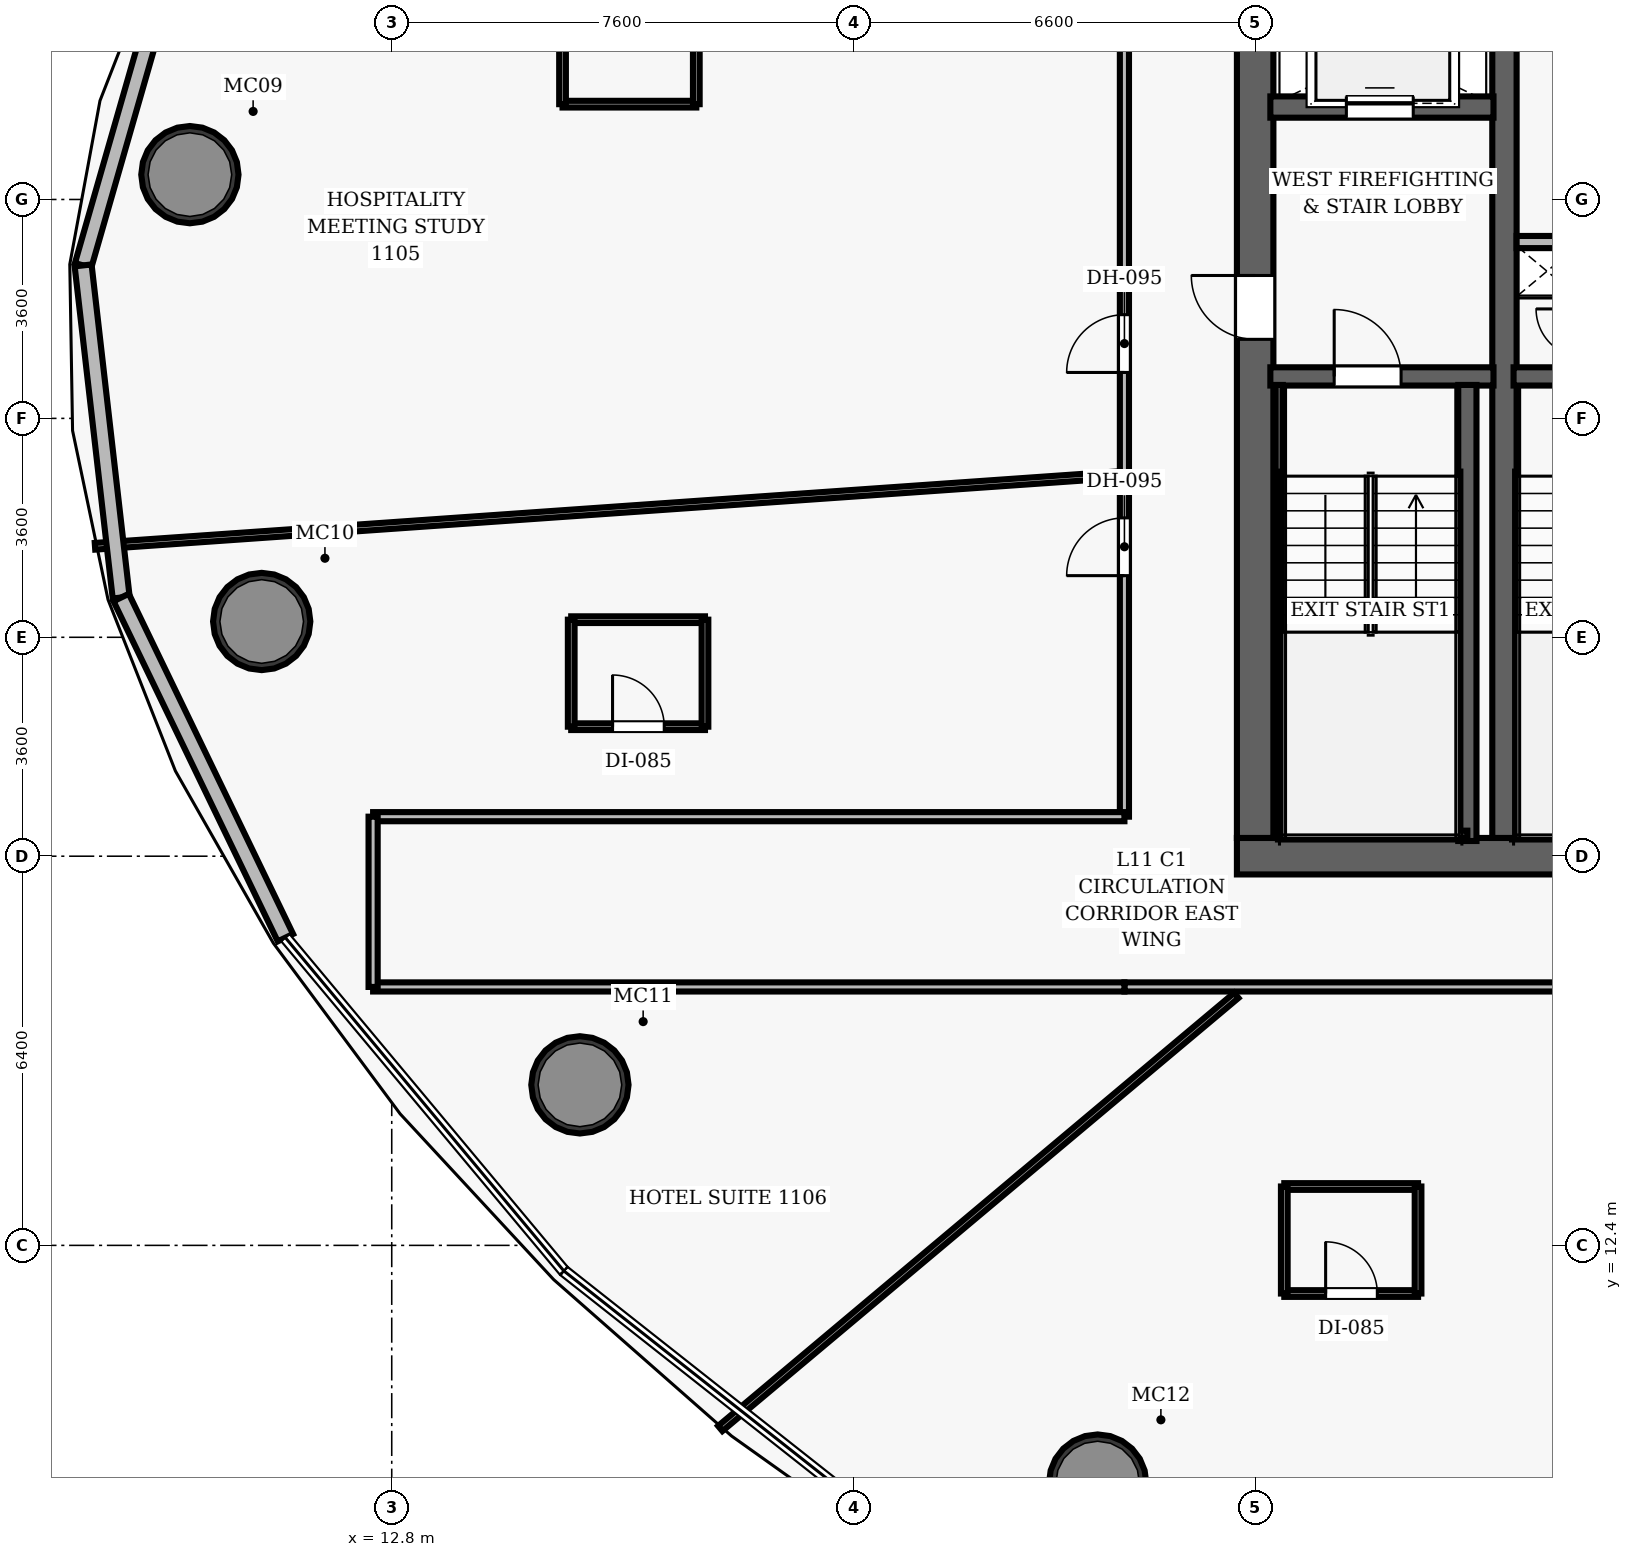
"""IFC4 building model, lengths in metres.
Left out: names, types, materials, properties, quantities, classifications, styles, units other than length and angle.
Written with IfcOpenShell. Run it as: python <this file> out.ifc"""

import sys

from ifc_helpers import new_model, si_unit, direction, frame, frame_2d, origin, origin_2d, place, context, subcontext, project, spatial, rectangle, hollow_circle, extrude, element, fill, save


model = new_model("IFC4")
c1 = context("Model", 3, precision=1e-05, world=origin(), true_north=direction((0.0, 1.0)))
c2 = subcontext(c1, "Body", "Model", "MODEL_VIEW")
j1 = project(units=[si_unit("LENGTHUNIT", "METRE"), si_unit("PLANEANGLEUNIT", "RADIAN")], contexts=[c1])
p1 = place(None, origin())
s1 = spatial("IfcSite", under=j1, at=p1, CompositionType="ELEMENT")
p2 = place(p1, origin())
s2 = spatial("IfcBuilding", under=s1, at=p2, CompositionType="ELEMENT")
p3 = place(p2, frame((0.0, 0.0, 55.4)))
s3 = spatial("IfcBuildingStorey", under=s2, at=p3, CompositionType="ELEMENT", Elevation=55.4)
p4 = place(p3, frame((26.7, 18.8, 0.0), z_axis=(0.0, 0.0, 1.0), x_axis=(1.0, 0.0, 0.0)))
e1 = element("IfcWall", 1, at=p4, inside=s3, PredefinedType="SHEAR", context=c2, shape_type="SweptSolid", body=[
    extrude(rectangle(XDim=22.6, YDim=0.6, at=frame_2d((11.3, 0.0))), origin(), (0.0, 0.0, 1.0), 3.5),
])
p5 = place(p4, frame((14.52, 0.0, 0.0)))
e2 = element("IfcOpeningElement", 2, at=p5, cuts=e1, PredefinedType="OPENING", context=c2, shape_type="SweptSolid", body=[
    extrude(rectangle(XDim=1.05, YDim=2.15, at=frame_2d((0.525, 1.075))), frame((0.0, 0.31, 0.0), z_axis=(0.0, -1.0, 0.0), x_axis=(1.0, 0.0, 0.0)), (0.0, 0.0, 1.0), 0.62),
])
p6 = place(p3, frame((27.0, 19.1, 0.0), z_axis=(0.0, 0.0, 1.0), x_axis=(0.0, 1.0, 0.0)))
e3 = element("IfcWall", 3, at=p6, inside=s3, PredefinedType="SHEAR", context=c2, shape_type="SweptSolid", body=[
    extrude(rectangle(XDim=13.8, YDim=0.6, at=frame_2d((6.9, 0.0))), origin(), (0.0, 0.0, 1.0), 3.5),
])
p7 = place(p6, frame((8.2, 0.0, 0.0)))
e4 = element("IfcOpeningElement", 4, at=p7, cuts=e3, PredefinedType="OPENING", context=c2, shape_type="SweptSolid", body=[
    extrude(rectangle(XDim=1.05, YDim=2.15, at=frame_2d((0.525, 1.075))), frame((0.0, 0.31, 0.0), z_axis=(0.0, -1.0, 0.0), x_axis=(1.0, 0.0, 0.0)), (0.0, 0.0, 1.0), 0.62),
])
p8 = place(p3, frame((31.1, 19.1, 0.0), z_axis=(0.0, 0.0, 1.0), x_axis=(0.0, 1.0, 0.0)))
e5 = element("IfcWall", 5, at=p8, inside=s3, PredefinedType="SHEAR", context=c2, shape_type="SweptSolid", body=[
    extrude(rectangle(XDim=13.8, YDim=0.4, at=frame_2d((6.9, 0.0))), origin(), (0.0, 0.0, 1.0), 3.5),
])
for number, where, z_axis, x_axis in (
    (6, (9.48, 30.008, 0.0), (0.0, 0.0, 1.0), (1.0, 0.0, 0.0)),
    (7, (10.661, 22.66, 0.0), (0.0, 0.0, 1.0), (1.0, 0.0, 0.0)),
    (8, (15.895, 15.04, 0.0), (0.0, 0.0, 1.0), (1.0, 0.0, 0.0)),
    (9, (24.41, 8.491, 0.0), (0.0, 0.0, 1.0), (1.0, 0.0, 0.0)),
):
    element("IfcColumn", number, at=place(p3, frame(where, z_axis=z_axis, x_axis=x_axis)), inside=s3, PredefinedType="COLUMN", context=c2, shape_type="SweptSolid", body=[
        extrude(hollow_circle(Radius=0.8, WallThickness=0.06, at=origin_2d()), origin(), (0.0, 0.0, 1.0), 3.5),
    ])
p9 = place(p3, frame((27.25, 26.69, 0.0), z_axis=(0.0, 0.0, 1.0), x_axis=(1.0, 0.0, 0.0)))
e10 = element("IfcWall", 10, at=p9, inside=s3, PredefinedType="SHEAR", context=c2, shape_type="SweptSolid", body=[
    extrude(rectangle(XDim=3.67, YDim=0.3, at=frame_2d((1.835, 0.0))), origin(), (0.0, 0.0, 1.0), 3.5),
])
p10 = place(p9, frame((1.05, 0.0, 0.0)))
e11 = element("IfcOpeningElement", 11, at=p10, cuts=e10, PredefinedType="OPENING", context=c2, shape_type="SweptSolid", body=[
    extrude(rectangle(XDim=1.1, YDim=2.15, at=frame_2d((0.55, 1.075))), frame((0.0, 0.16, 0.0), z_axis=(0.0, -1.0, 0.0), x_axis=(1.0, 0.0, 0.0)), (0.0, 0.0, 1.0), 0.32),
])
p11 = place(p3, frame((30.49, 19.05, 0.0), z_axis=(0.0, 0.0, 1.0), x_axis=(0.0, 1.0, 0.0)))
e12 = element("IfcWall", 12, at=p11, inside=s3, PredefinedType="SHEAR", context=c2, shape_type="SweptSolid", body=[
    extrude(rectangle(XDim=7.5, YDim=0.3, at=frame_2d((3.75, 0.0))), origin(), (0.0, 0.0, 1.0), 3.5),
])
p12 = place(p3, frame((27.395, 19.1, 0.0), z_axis=(0.0, 0.0, 1.0), x_axis=(0.0, 1.0, 0.0)))
e13 = element("IfcWall", 13, at=p12, inside=s3, PredefinedType="SHEAR", context=c2, shape_type="SweptSolid", body=[
    extrude(rectangle(XDim=7.45, YDim=0.12, at=frame_2d((3.725, 0.0))), origin(), (0.0, 0.0, 1.0), 3.5),
])
p13 = place(p3, frame((27.395, 19.16, 0.0), z_axis=(0.0, 0.0, 1.0), x_axis=(1.0, 0.0, 0.0)))
e14 = element("IfcWall", 14, at=p13, inside=s3, PredefinedType="SHEAR", context=c2, shape_type="SweptSolid", body=[
    extrude(rectangle(XDim=3.095, YDim=0.12, at=frame_2d((1.547, 0.0))), origin(), (0.0, 0.0, 1.0), 3.5),
])
p14 = place(p3, frame((27.25, 31.12, 0.0), z_axis=(0.0, 0.0, 1.0), x_axis=(1.0, 0.0, 0.0)))
e15 = element("IfcWall", 15, at=p14, inside=s3, PredefinedType="SHEAR", context=c2, shape_type="SweptSolid", body=[
    extrude(rectangle(XDim=3.67, YDim=0.35, at=frame_2d((1.835, 0.0))), origin(), (0.0, 0.0, 1.0), 2.6),
])
p15 = place(p14, frame((1.25, 0.0, 0.0)))
e16 = element("IfcOpeningElement", 16, at=p15, cuts=e15, PredefinedType="OPENING", context=c2, shape_type="SweptSolid", body=[
    extrude(rectangle(XDim=1.1, YDim=2.15, at=frame_2d((0.55, 1.075))), frame((0.0, 0.185, 0.0), z_axis=(0.0, -1.0, 0.0), x_axis=(1.0, 0.0, 0.0)), (0.0, 0.0, 1.0), 0.37),
])
p16 = place(p3, frame((31.25, 26.69, 0.0), z_axis=(0.0, 0.0, 1.0), x_axis=(1.0, 0.0, 0.0)))
e17 = element("IfcWall", 17, at=p16, inside=s3, PredefinedType="SHEAR", context=c2, shape_type="SweptSolid", body=[
    extrude(rectangle(XDim=3.56, YDim=0.3, at=frame_2d((1.78, 0.0))), origin(), (0.0, 0.0, 1.0), 3.5),
])
p17 = place(p16, frame((1.55, 0.0, 0.0)))
e18 = element("IfcOpeningElement", 18, at=p17, cuts=e17, PredefinedType="OPENING", context=c2, shape_type="SweptSolid", body=[
    extrude(rectangle(XDim=1.1, YDim=2.15, at=frame_2d((0.55, 1.075))), frame((0.0, 0.16, 0.0), z_axis=(0.0, -1.0, 0.0), x_axis=(1.0, 0.0, 0.0)), (0.0, 0.0, 1.0), 0.32),
])
p18 = place(p3, frame((31.3, 19.16, 0.0), z_axis=(0.0, 0.0, 1.0), x_axis=(1.0, 0.0, 0.0)))
e19 = element("IfcWall", 19, at=p18, inside=s3, PredefinedType="SHEAR", context=c2, shape_type="SweptSolid", body=[
    extrude(rectangle(XDim=3.04, YDim=0.12, at=frame_2d((1.52, 0.0))), origin(), (0.0, 0.0, 1.0), 3.5),
])
p19 = place(p3, frame((31.3, 28.9, 0.0), z_axis=(0.0, 0.0, 1.0), x_axis=(1.0, 0.0, 0.0)))
e20 = element("IfcWall", 20, at=p19, inside=s3, PredefinedType="PARTITIONING", context=c2, shape_type="SweptSolid", body=[
    extrude(rectangle(XDim=1.12, YDim=0.2, at=frame_2d((0.56, 0.0))), origin(), (0.0, 0.0, 1.0), 2.6),
])
p20 = place(p3, frame((24.85, 16.65, 0.0), z_axis=(0.0, 0.0, 1.0), x_axis=(1.0, 0.0, 0.0)))
e21 = element("IfcWall", 21, at=p20, inside=s3, PredefinedType="PARTITIONING", context=c2, shape_type="SweptSolid", body=[
    extrude(rectangle(XDim=23.5, YDim=0.15, at=frame_2d((11.75, 0.0))), origin(), (0.0, 0.0, 1.0), 2.6),
])
p21 = place(p20, frame((8.216, 0.0, 0.0)))
e22 = element("IfcOpeningElement", 22, at=p21, cuts=e21, PredefinedType="OPENING", context=c2, shape_type="SweptSolid", body=[
    extrude(rectangle(XDim=0.95, YDim=2.15, at=frame_2d((0.475, 1.075))), frame((0.0, 0.085, 0.0), z_axis=(0.0, -1.0, 0.0), x_axis=(1.0, 0.0, 0.0)), (0.0, 0.0, 1.0), 0.17),
])
p22 = place(p20, frame((15.103, 0.0, 0.0)))
e23 = element("IfcOpeningElement", 23, at=p22, cuts=e21, PredefinedType="OPENING", context=c2, shape_type="SweptSolid", body=[
    extrude(rectangle(XDim=0.95, YDim=2.15, at=frame_2d((0.475, 1.075))), frame((0.0, 0.085, 0.0), z_axis=(0.0, -1.0, 0.0), x_axis=(1.0, 0.0, 0.0)), (0.0, 0.0, 1.0), 0.17),
])
p23 = place(p20, frame((17.91, 0.0, 0.0)))
e24 = element("IfcOpeningElement", 24, at=p23, cuts=e21, PredefinedType="OPENING", context=c2, shape_type="SweptSolid", body=[
    extrude(rectangle(XDim=0.95, YDim=2.15, at=frame_2d((0.475, 1.075))), frame((0.0, 0.085, 0.0), z_axis=(0.0, -1.0, 0.0), x_axis=(1.0, 0.0, 0.0)), (0.0, 0.0, 1.0), 0.17),
])
p24 = place(p3, frame((24.85, 19.45, 0.0), z_axis=(0.0, 0.0, 1.0), x_axis=(0.0, 1.0, 0.0)))
e25 = element("IfcWall", 25, at=p24, inside=s3, PredefinedType="PARTITIONING", context=c2, shape_type="SweptSolid", body=[
    extrude(rectangle(XDim=15.9, YDim=0.15, at=frame_2d((7.95, 0.0))), origin(), (0.0, 0.0, 1.0), 2.6),
])
p25 = place(p24, frame((7.305, 0.0, 0.0)))
e26 = element("IfcOpeningElement", 26, at=p25, cuts=e25, PredefinedType="OPENING", context=c2, shape_type="SweptSolid", body=[
    extrude(rectangle(XDim=0.95, YDim=2.15, at=frame_2d((0.475, 1.075))), frame((0.0, 0.085, 0.0), z_axis=(0.0, -1.0, 0.0), x_axis=(1.0, 0.0, 0.0)), (0.0, 0.0, 1.0), 0.17),
])
p26 = place(p24, frame((3.964, 0.0, 0.0)))
e27 = element("IfcOpeningElement", 27, at=p26, cuts=e25, PredefinedType="OPENING", context=c2, shape_type="SweptSolid", body=[
    extrude(rectangle(XDim=0.95, YDim=2.15, at=frame_2d((0.475, 1.075))), frame((0.0, 0.085, 0.0), z_axis=(0.0, -1.0, 0.0), x_axis=(1.0, 0.0, 0.0)), (0.0, 0.0, 1.0), 0.17),
])
for number, where, z_axis, x_axis in (
    (28, (12.494, 19.45, 0.0), (0.0, 0.0, 1.0), (1.0, 0.0, 0.0)),
    (29, (12.494, 16.65, 0.0), (0.0, 0.0, 1.0), (1.0, 0.0, 0.0)),
):
    element("IfcWall", number, at=place(p3, frame(where, z_axis=z_axis, x_axis=x_axis)), inside=s3, PredefinedType="PARTITIONING", context=c2, shape_type="SweptSolid", body=[
        extrude(rectangle(XDim=12.356, YDim=0.15, at=frame_2d((6.178, 0.0))), origin(), (0.0, 0.0, 1.0), 2.6),
    ])
p27 = place(p3, frame((12.494, 16.65, 0.0), z_axis=(0.0, 0.0, 1.0), x_axis=(0.0, 1.0, 0.0)))
e30 = element("IfcWall", 30, at=p27, inside=s3, PredefinedType="PARTITIONING", context=c2, shape_type="SweptSolid", body=[
    extrude(rectangle(XDim=2.8, YDim=0.15, at=frame_2d((1.4, 0.0))), origin(), (0.0, 0.0, 1.0), 2.6),
])
p28 = place(p3, frame((24.71, 25.071, 0.0), z_axis=(0.0, 0.0, 1.0), x_axis=(-0.997563188769, -0.069768792538, 0.0)))
e31 = element("IfcWall", 31, at=p28, inside=s3, PredefinedType="PARTITIONING", context=c2, shape_type="SweptSolid", body=[
    extrude(rectangle(XDim=16.832, YDim=0.11, at=frame_2d((8.416, 0.0))), origin(), (0.0, 0.0, 1.0), 2.6),
])
p29 = place(p3, frame((26.69, 16.51, 0.0), z_axis=(0.0, 0.0, 1.0), x_axis=(-0.766038579341, -0.642794597801, 0.0)))
e32 = element("IfcWall", 32, at=p29, inside=s3, PredefinedType="PARTITIONING", context=c2, shape_type="SweptSolid", body=[
    extrude(rectangle(XDim=11.08, YDim=0.11, at=frame_2d((5.54, 0.0))), origin(), (0.0, 0.0, 1.0), 2.6),
])
p30 = place(p3, frame((15.609, 31.167, 0.0), z_axis=(0.0, 0.0, 1.0), x_axis=(1.0, 0.0, 0.0)))
e33 = element("IfcWall", 33, at=p30, inside=s3, PredefinedType="PARTITIONING", context=c2, shape_type="SweptSolid", body=[
    extrude(rectangle(XDim=2.2, YDim=0.11, at=frame_2d((1.1, 0.0))), origin(), (0.0, 0.0, 1.0), 2.6),
])
for number, where, z_axis, x_axis in (
    (34, (15.609, 31.167, 0.0), (0.0, 0.0, 1.0), (0.0, 1.0, 0.0)),
    (35, (17.809, 31.167, 0.0), (0.0, 0.0, 1.0), (0.0, 1.0, 0.0)),
):
    element("IfcWall", number, at=place(p3, frame(where, z_axis=z_axis, x_axis=x_axis)), inside=s3, PredefinedType="PARTITIONING", context=c2, shape_type="SweptSolid", body=[
        extrude(rectangle(XDim=1.76, YDim=0.11, at=frame_2d((0.88, 0.0))), origin(), (0.0, 0.0, 1.0), 2.6),
    ])
p31 = place(p3, frame((15.752, 20.93, 0.0), z_axis=(0.0, 0.0, 1.0), x_axis=(1.0, 0.0, 0.0)))
e36 = element("IfcWall", 36, at=p31, inside=s3, PredefinedType="PARTITIONING", context=c2, shape_type="SweptSolid", body=[
    extrude(rectangle(XDim=2.2, YDim=0.11, at=frame_2d((1.1, 0.0))), origin(), (0.0, 0.0, 1.0), 2.6),
])
p32 = place(p31, frame((0.68, 0.0, 0.0)))
e37 = element("IfcOpeningElement", 37, at=p32, cuts=e36, PredefinedType="OPENING", context=c2, shape_type="SweptSolid", body=[
    extrude(rectangle(XDim=0.85, YDim=2.1, at=frame_2d((0.425, 1.05))), frame((0.0, 0.065, 0.0), z_axis=(0.0, -1.0, 0.0), x_axis=(1.0, 0.0, 0.0)), (0.0, 0.0, 1.0), 0.13),
])
p33 = place(p3, frame((15.752, 22.69, 0.0), z_axis=(0.0, 0.0, 1.0), x_axis=(1.0, 0.0, 0.0)))
e38 = element("IfcWall", 38, at=p33, inside=s3, PredefinedType="PARTITIONING", context=c2, shape_type="SweptSolid", body=[
    extrude(rectangle(XDim=2.2, YDim=0.11, at=frame_2d((1.1, 0.0))), origin(), (0.0, 0.0, 1.0), 2.6),
])
for number, where, z_axis, x_axis in (
    (39, (15.752, 20.93, 0.0), (0.0, 0.0, 1.0), (0.0, 1.0, 0.0)),
    (40, (17.952, 20.93, 0.0), (0.0, 0.0, 1.0), (0.0, 1.0, 0.0)),
):
    element("IfcWall", number, at=place(p3, frame(where, z_axis=z_axis, x_axis=x_axis)), inside=s3, PredefinedType="PARTITIONING", context=c2, shape_type="SweptSolid", body=[
        extrude(rectangle(XDim=1.76, YDim=0.11, at=frame_2d((0.88, 0.0))), origin(), (0.0, 0.0, 1.0), 2.6),
    ])
p34 = place(p3, frame((27.479, 11.608, 0.0), z_axis=(0.0, 0.0, 1.0), x_axis=(1.0, 0.0, 0.0)))
e41 = element("IfcWall", 41, at=p34, inside=s3, PredefinedType="PARTITIONING", context=c2, shape_type="SweptSolid", body=[
    extrude(rectangle(XDim=2.2, YDim=0.11, at=frame_2d((1.1, 0.0))), origin(), (0.0, 0.0, 1.0), 2.6),
])
p35 = place(p34, frame((0.68, 0.0, 0.0)))
e42 = element("IfcOpeningElement", 42, at=p35, cuts=e41, PredefinedType="OPENING", context=c2, shape_type="SweptSolid", body=[
    extrude(rectangle(XDim=0.85, YDim=2.1, at=frame_2d((0.425, 1.05))), frame((0.0, 0.065, 0.0), z_axis=(0.0, -1.0, 0.0), x_axis=(1.0, 0.0, 0.0)), (0.0, 0.0, 1.0), 0.13),
])
p36 = place(p3, frame((27.479, 13.368, 0.0), z_axis=(0.0, 0.0, 1.0), x_axis=(1.0, 0.0, 0.0)))
e43 = element("IfcWall", 43, at=p36, inside=s3, PredefinedType="PARTITIONING", context=c2, shape_type="SweptSolid", body=[
    extrude(rectangle(XDim=2.2, YDim=0.11, at=frame_2d((1.1, 0.0))), origin(), (0.0, 0.0, 1.0), 2.6),
])
for number, where, z_axis, x_axis in (
    (44, (27.479, 11.608, 0.0), (0.0, 0.0, 1.0), (0.0, 1.0, 0.0)),
    (45, (29.679, 11.608, 0.0), (0.0, 0.0, 1.0), (0.0, 1.0, 0.0)),
):
    element("IfcWall", number, at=place(p3, frame(where, z_axis=z_axis, x_axis=x_axis)), inside=s3, PredefinedType="PARTITIONING", context=c2, shape_type="SweptSolid", body=[
        extrude(rectangle(XDim=1.76, YDim=0.11, at=frame_2d((0.88, 0.0))), origin(), (0.0, 0.0, 1.0), 2.6),
    ])
p37 = place(p3, frame((7.724, 28.516, 0.0), z_axis=(0.0, 0.0, 1.0), x_axis=(0.276263330445, 0.961081979985, 0.0)))
e46 = element("IfcWall", 46, at=p37, inside=s3, PredefinedType="SOLIDWALL", context=c2, shape_type="SweptSolid", body=[
    extrude(rectangle(XDim=5.498, YDim=0.28, at=frame_2d((2.749, 0.0))), origin(), (0.0, 0.0, 1.0), 3.25),
])
p38 = place(p3, frame((8.35, 23.054, 0.0), z_axis=(0.0, 0.0, 1.0), x_axis=(-0.113872248862, 0.993495400563, 0.0)))
e47 = element("IfcWall", 47, at=p38, inside=s3, PredefinedType="SOLIDWALL", context=c2, shape_type="SweptSolid", body=[
    extrude(rectangle(XDim=5.497, YDim=0.28, at=frame_2d((2.749, 0.0))), origin(), (0.0, 0.0, 1.0), 3.25),
])
p39 = place(p3, frame((11.051, 17.46, 0.0), z_axis=(0.0, 0.0, 1.0), x_axis=(-0.434783136193, 0.900535187809, 0.0)))
e48 = element("IfcWall", 48, at=p39, inside=s3, PredefinedType="SOLIDWALL", context=c2, shape_type="SweptSolid", body=[
    extrude(rectangle(XDim=6.212, YDim=0.28, at=frame_2d((3.106, 0.0))), origin(), (0.0, 0.0, 1.0), 3.25),
])
p40 = place(p10, origin())
e49 = element("IfcDoor", 49, at=p40, inside=s3, OperationType="SINGLE_SWING_LEFT", PredefinedType="DOOR", context=c2, shape_type="SweptSolid", body=[
    extrude(rectangle(XDim=1.1, YDim=2.15, at=frame_2d((0.55, 1.075))), frame((0.0, 0.025, 0.0), z_axis=(0.0, -1.0, 0.0), x_axis=(1.0, 0.0, 0.0)), (0.0, 0.0, 1.0), 0.05),
])
fill(e11, e49)
p41 = place(p7, origin())
e50 = element("IfcDoor", 50, at=p41, inside=s3, OperationType="SINGLE_SWING_RIGHT", PredefinedType="DOOR", context=c2, shape_type="SweptSolid", body=[
    extrude(rectangle(XDim=1.05, YDim=2.15, at=frame_2d((0.525, 1.075))), frame((0.0, 0.025, 0.0), z_axis=(0.0, -1.0, 0.0), x_axis=(1.0, 0.0, 0.0)), (0.0, 0.0, 1.0), 0.05),
])
fill(e4, e50)
p42 = place(p25, origin())
e51 = element("IfcDoor", 51, at=p42, inside=s3, OperationType="SINGLE_SWING_LEFT", PredefinedType="DOOR", context=c2, shape_type="SweptSolid", body=[
    extrude(rectangle(XDim=0.95, YDim=2.15, at=frame_2d((0.475, 1.075))), frame((0.0, 0.025, 0.0), z_axis=(0.0, -1.0, 0.0), x_axis=(1.0, 0.0, 0.0)), (0.0, 0.0, 1.0), 0.05),
])
fill(e26, e51)
p43 = place(p26, origin())
e52 = element("IfcDoor", 52, at=p43, inside=s3, OperationType="SINGLE_SWING_LEFT", PredefinedType="DOOR", context=c2, shape_type="SweptSolid", body=[
    extrude(rectangle(XDim=0.95, YDim=2.15, at=frame_2d((0.475, 1.075))), frame((0.0, 0.025, 0.0), z_axis=(0.0, -1.0, 0.0), x_axis=(1.0, 0.0, 0.0)), (0.0, 0.0, 1.0), 0.05),
])
fill(e27, e52)
p44 = place(p32, origin())
e53 = element("IfcDoor", 53, at=p44, inside=s3, OperationType="SINGLE_SWING_LEFT", PredefinedType="DOOR", context=c2, shape_type="SweptSolid", body=[
    extrude(rectangle(XDim=0.85, YDim=2.1, at=frame_2d((0.425, 1.05))), frame((0.0, 0.025, 0.0), z_axis=(0.0, -1.0, 0.0), x_axis=(1.0, 0.0, 0.0)), (0.0, 0.0, 1.0), 0.05),
])
fill(e37, e53)
p45 = place(p35, origin())
e54 = element("IfcDoor", 54, at=p45, inside=s3, OperationType="SINGLE_SWING_LEFT", PredefinedType="DOOR", context=c2, shape_type="SweptSolid", body=[
    extrude(rectangle(XDim=0.85, YDim=2.1, at=frame_2d((0.425, 1.05))), frame((0.0, 0.025, 0.0), z_axis=(0.0, -1.0, 0.0), x_axis=(1.0, 0.0, 0.0)), (0.0, 0.0, 1.0), 0.05),
])
fill(e42, e54)
p46 = place(p15, origin())
e55 = element("IfcDoor", 55, at=p46, inside=s3, OperationType="SLIDING_TO_LEFT", PredefinedType="DOOR", context=c2, shape_type="SweptSolid", body=[
    extrude(rectangle(XDim=1.1, YDim=2.15, at=frame_2d((0.55, 1.075))), frame((0.0, 0.025, 0.0), z_axis=(0.0, -1.0, 0.0), x_axis=(1.0, 0.0, 0.0)), (0.0, 0.0, 1.0), 0.05),
])
fill(e16, e55)
save(model, sys.argv[1])
